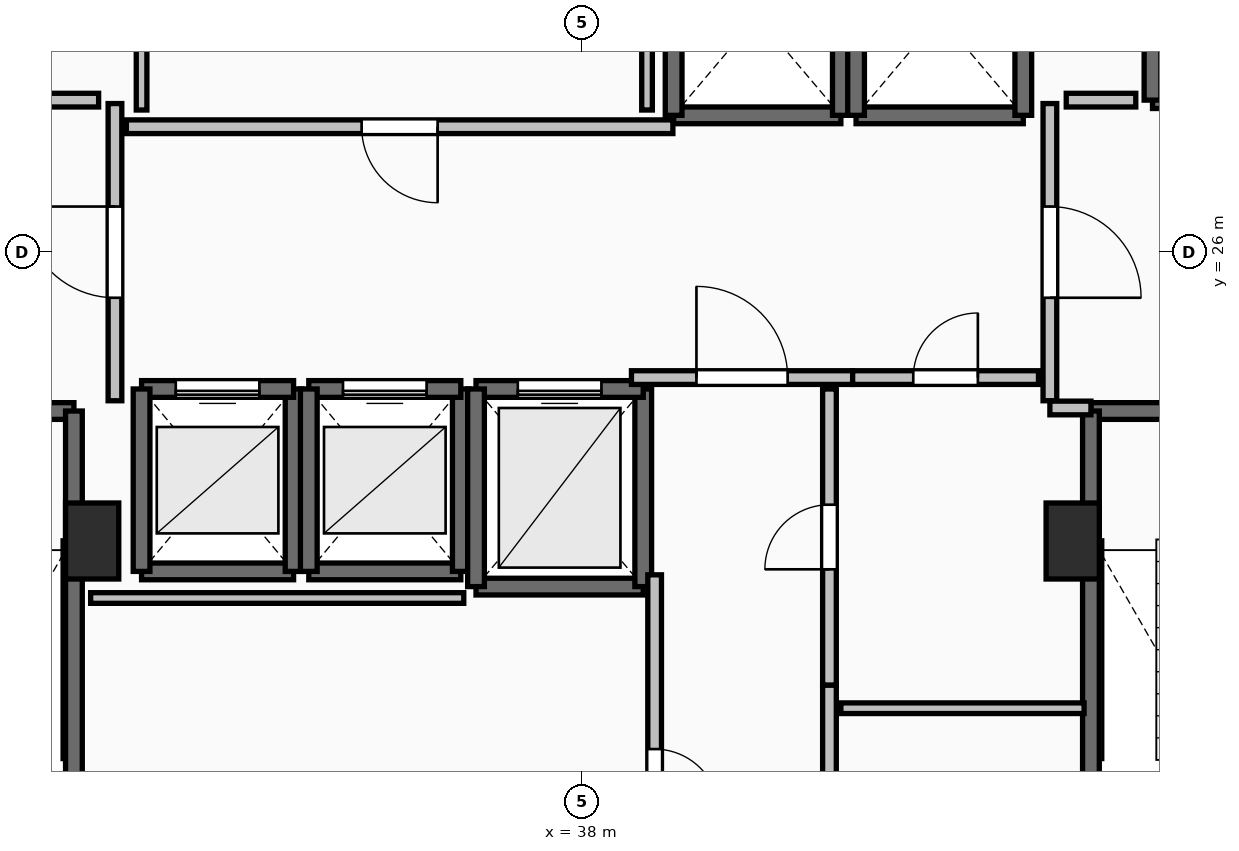
"""IFC4 building model, lengths in metres.
Left out: names, types, materials, properties, quantities, classifications, styles, units other than length and angle.
Written with IfcOpenShell. Run it as: python <this file> out.ifc"""

import sys

from ifc_helpers import new_model, si_unit, direction, frame, frame_2d, origin, origin_2d, place, context, subcontext, project, spatial, rectangle, extrude, element, fill, save


model = new_model("IFC4")
c1 = context("Model", 3, precision=1e-05, world=origin(), true_north=direction((0.0, 1.0)))
c2 = subcontext(c1, "Body", "Model", "MODEL_VIEW")
j1 = project(units=[si_unit("LENGTHUNIT", "METRE"), si_unit("PLANEANGLEUNIT", "RADIAN")], contexts=[c1])
p1 = place(None, origin())
s1 = spatial("IfcSite", under=j1, at=p1, CompositionType="ELEMENT")
p2 = place(p1, origin())
s2 = spatial("IfcBuilding", under=s1, at=p2, CompositionType="ELEMENT")
p3 = place(p2, frame((0.0, 0.0, 207.2)))
s3 = spatial("IfcBuildingStorey", under=s2, at=p3, CompositionType="ELEMENT", Elevation=207.2)
for number, where, z_axis, x_axis in (
    (1, (31.55, 22.2, 0.0), (0.0, 0.0, 1.0), (1.0, 0.0, 0.0)),
    (2, (44.45, 22.2, 0.0), (0.0, 0.0, 1.0), (1.0, 0.0, 0.0)),
):
    element("IfcColumn", number, at=place(p3, frame(where, z_axis=z_axis, x_axis=x_axis)), inside=s3, PredefinedType="PILASTER", context=c2, shape_type="SweptSolid", body=[
        extrude(rectangle(XDim=0.7, YDim=1.0, at=origin_2d()), origin(), (0.0, 0.0, 1.0), 3.55),
    ])
p4 = place(p3, frame((27.94, 23.91, 0.0), z_axis=(0.0, 0.0, 1.0), x_axis=(1.0, 0.0, 0.0)))
e3 = element("IfcWall", 3, at=p4, inside=s3, PredefinedType="SOLIDWALL", context=c2, shape_type="SweptSolid", body=[
    extrude(rectangle(XDim=3.37, YDim=0.22, at=frame_2d((1.685, 0.0))), origin(), (0.0, 0.0, 1.0), 3.29),
])
p5 = place(p4, frame((1.135, 0.0, 0.0)))
e4 = element("IfcOpeningElement", 4, at=p5, cuts=e3, PredefinedType="OPENING", context=c2, shape_type="SweptSolid", body=[
    extrude(rectangle(XDim=1.1, YDim=2.15, at=frame_2d((0.55, 1.075))), frame((0.0, 0.125, 0.0), z_axis=(0.0, -1.0, 0.0), x_axis=(1.0, 0.0, 0.0)), (0.0, 0.0, 1.0), 0.25),
])
p6 = place(p3, frame((31.31, 23.91, 0.0), z_axis=(0.0, 0.0, 1.0), x_axis=(0.0, -1.0, 0.0)))
e5 = element("IfcWall", 5, at=p6, inside=s3, PredefinedType="SOLIDWALL", context=c2, shape_type="SweptSolid", body=[
    extrude(rectangle(XDim=7.42, YDim=0.22, at=frame_2d((3.71, 0.0))), origin(), (0.0, 0.0, 1.0), 3.29),
])
p7 = place(p3, frame((44.69, 23.91, 0.0), z_axis=(0.0, 0.0, 1.0), x_axis=(1.0, 0.0, 0.0)))
e6 = element("IfcWall", 6, at=p7, inside=s3, PredefinedType="SOLIDWALL", context=c2, shape_type="SweptSolid", body=[
    extrude(rectangle(XDim=3.37, YDim=0.22, at=frame_2d((1.685, 0.0))), origin(), (0.0, 0.0, 1.0), 3.29),
])
p8 = place(p7, frame((1.135, 0.0, 0.0)))
e7 = element("IfcOpeningElement", 7, at=p8, cuts=e6, PredefinedType="OPENING", context=c2, shape_type="SweptSolid", body=[
    extrude(rectangle(XDim=1.1, YDim=2.15, at=frame_2d((0.55, 1.075))), frame((0.0, 0.125, 0.0), z_axis=(0.0, -1.0, 0.0), x_axis=(1.0, 0.0, 0.0)), (0.0, 0.0, 1.0), 0.25),
])
p9 = place(p3, frame((44.69, 16.49, 0.0), z_axis=(0.0, 0.0, 1.0), x_axis=(0.0, 1.0, 0.0)))
e8 = element("IfcWall", 8, at=p9, inside=s3, PredefinedType="SOLIDWALL", context=c2, shape_type="SweptSolid", body=[
    extrude(rectangle(XDim=7.42, YDim=0.22, at=frame_2d((3.71, 0.0))), origin(), (0.0, 0.0, 1.0), 3.29),
])
p10 = place(p3, frame((32.2, 21.8, 0.0), z_axis=(0.0, 0.0, 1.0), x_axis=(1.0, 0.0, 0.0)))
e9 = element("IfcWall", 9, at=p10, inside=s3, PredefinedType="SOLIDWALL", context=c2, shape_type="SweptSolid", body=[
    extrude(rectangle(XDim=2.0, YDim=0.22, at=frame_2d((1.0, 0.0))), origin(), (0.0, 0.0, 1.0), 3.29),
])
p11 = place(p3, frame((34.2, 21.8, 0.0), z_axis=(0.0, 0.0, 1.0), x_axis=(0.0, 1.0, 0.0)))
e10 = element("IfcWall", 10, at=p11, inside=s3, PredefinedType="SOLIDWALL", context=c2, shape_type="SweptSolid", body=[
    extrude(rectangle(XDim=2.4, YDim=0.22, at=frame_2d((1.2, 0.0))), origin(), (0.0, 0.0, 1.0), 3.29),
])
p12 = place(p3, frame((34.2, 24.2, 0.0), z_axis=(0.0, 0.0, 1.0), x_axis=(-1.0, 0.0, 0.0)))
e11 = element("IfcWall", 11, at=p12, inside=s3, PredefinedType="SOLIDWALL", context=c2, shape_type="SweptSolid", body=[
    extrude(rectangle(XDim=2.0, YDim=0.22, at=frame_2d((1.0, 0.0))), origin(), (0.0, 0.0, 1.0), 3.29),
])
p13 = place(p12, frame((0.45, 0.0, 0.0)))
e12 = element("IfcOpeningElement", 12, at=p13, cuts=e11, PredefinedType="OPENING", context=c2, shape_type="SweptSolid", body=[
    extrude(rectangle(XDim=1.1, YDim=2.2, at=frame_2d((0.55, 1.1))), frame((0.0, 0.125, 0.0), z_axis=(0.0, -1.0, 0.0), x_axis=(1.0, 0.0, 0.0)), (0.0, 0.0, 1.0), 0.25),
])
p14 = place(p3, frame((32.2, 24.2, 0.0), z_axis=(0.0, 0.0, 1.0), x_axis=(0.0, -1.0, 0.0)))
e13 = element("IfcWall", 13, at=p14, inside=s3, PredefinedType="SOLIDWALL", context=c2, shape_type="SweptSolid", body=[
    extrude(rectangle(XDim=2.4, YDim=0.22, at=frame_2d((1.2, 0.0))), origin(), (0.0, 0.0, 1.0), 3.29),
])
p15 = place(p3, frame((34.4, 21.8, 0.0), z_axis=(0.0, 0.0, 1.0), x_axis=(1.0, 0.0, 0.0)))
e14 = element("IfcWall", 14, at=p15, inside=s3, PredefinedType="SOLIDWALL", context=c2, shape_type="SweptSolid", body=[
    extrude(rectangle(XDim=2.0, YDim=0.22, at=frame_2d((1.0, 0.0))), origin(), (0.0, 0.0, 1.0), 3.29),
])
p16 = place(p3, frame((36.4, 21.8, 0.0), z_axis=(0.0, 0.0, 1.0), x_axis=(0.0, 1.0, 0.0)))
e15 = element("IfcWall", 15, at=p16, inside=s3, PredefinedType="SOLIDWALL", context=c2, shape_type="SweptSolid", body=[
    extrude(rectangle(XDim=2.4, YDim=0.22, at=frame_2d((1.2, 0.0))), origin(), (0.0, 0.0, 1.0), 3.29),
])
p17 = place(p3, frame((36.4, 24.2, 0.0), z_axis=(0.0, 0.0, 1.0), x_axis=(-1.0, 0.0, 0.0)))
e16 = element("IfcWall", 16, at=p17, inside=s3, PredefinedType="SOLIDWALL", context=c2, shape_type="SweptSolid", body=[
    extrude(rectangle(XDim=2.0, YDim=0.22, at=frame_2d((1.0, 0.0))), origin(), (0.0, 0.0, 1.0), 3.29),
])
p18 = place(p17, frame((0.45, 0.0, 0.0)))
e17 = element("IfcOpeningElement", 17, at=p18, cuts=e16, PredefinedType="OPENING", context=c2, shape_type="SweptSolid", body=[
    extrude(rectangle(XDim=1.1, YDim=2.2, at=frame_2d((0.55, 1.1))), frame((0.0, 0.125, 0.0), z_axis=(0.0, -1.0, 0.0), x_axis=(1.0, 0.0, 0.0)), (0.0, 0.0, 1.0), 0.25),
])
p19 = place(p3, frame((34.4, 24.2, 0.0), z_axis=(0.0, 0.0, 1.0), x_axis=(0.0, -1.0, 0.0)))
e18 = element("IfcWall", 18, at=p19, inside=s3, PredefinedType="SOLIDWALL", context=c2, shape_type="SweptSolid", body=[
    extrude(rectangle(XDim=2.4, YDim=0.22, at=frame_2d((1.2, 0.0))), origin(), (0.0, 0.0, 1.0), 3.29),
])
p20 = place(p3, frame((36.6, 21.6, 0.0), z_axis=(0.0, 0.0, 1.0), x_axis=(1.0, 0.0, 0.0)))
e19 = element("IfcWall", 19, at=p20, inside=s3, PredefinedType="SOLIDWALL", context=c2, shape_type="SweptSolid", body=[
    extrude(rectangle(XDim=2.2, YDim=0.22, at=frame_2d((1.1, 0.0))), origin(), (0.0, 0.0, 1.0), 3.29),
])
p21 = place(p3, frame((38.8, 21.6, 0.0), z_axis=(0.0, 0.0, 1.0), x_axis=(0.0, 1.0, 0.0)))
e20 = element("IfcWall", 20, at=p21, inside=s3, PredefinedType="SOLIDWALL", context=c2, shape_type="SweptSolid", body=[
    extrude(rectangle(XDim=2.6, YDim=0.22, at=frame_2d((1.3, 0.0))), origin(), (0.0, 0.0, 1.0), 3.29),
])
p22 = place(p3, frame((38.8, 24.2, 0.0), z_axis=(0.0, 0.0, 1.0), x_axis=(-1.0, 0.0, 0.0)))
e21 = element("IfcWall", 21, at=p22, inside=s3, PredefinedType="SOLIDWALL", context=c2, shape_type="SweptSolid", body=[
    extrude(rectangle(XDim=2.2, YDim=0.22, at=frame_2d((1.1, 0.0))), origin(), (0.0, 0.0, 1.0), 3.29),
])
p23 = place(p22, frame((0.55, 0.0, 0.0)))
e22 = element("IfcOpeningElement", 22, at=p23, cuts=e21, PredefinedType="OPENING", context=c2, shape_type="SweptSolid", body=[
    extrude(rectangle(XDim=1.1, YDim=2.2, at=frame_2d((0.55, 1.1))), frame((0.0, 0.125, 0.0), z_axis=(0.0, -1.0, 0.0), x_axis=(1.0, 0.0, 0.0)), (0.0, 0.0, 1.0), 0.25),
])
p24 = place(p3, frame((36.6, 24.2, 0.0), z_axis=(0.0, 0.0, 1.0), x_axis=(0.0, -1.0, 0.0)))
e23 = element("IfcWall", 23, at=p24, inside=s3, PredefinedType="SOLIDWALL", context=c2, shape_type="SweptSolid", body=[
    extrude(rectangle(XDim=2.6, YDim=0.22, at=frame_2d((1.3, 0.0))), origin(), (0.0, 0.0, 1.0), 3.29),
])
p25 = place(p3, frame((39.2, 27.8, 0.0), z_axis=(0.0, 0.0, 1.0), x_axis=(1.0, 0.0, 0.0)))
e24 = element("IfcWall", 24, at=p25, inside=s3, PredefinedType="SOLIDWALL", context=c2, shape_type="SweptSolid", body=[
    extrude(rectangle(XDim=2.2, YDim=0.22, at=frame_2d((1.1, 0.0))), origin(), (0.0, 0.0, 1.0), 3.29),
])
for number, where, z_axis, x_axis in (
    (25, (41.4, 27.8, 0.0), (0.0, 0.0, 1.0), (0.0, 1.0, 0.0)),
    (26, (39.2, 30.4, 0.0), (0.0, 0.0, 1.0), (0.0, -1.0, 0.0)),
):
    element("IfcWall", number, at=place(p3, frame(where, z_axis=z_axis, x_axis=x_axis)), inside=s3, PredefinedType="SOLIDWALL", context=c2, shape_type="SweptSolid", body=[
        extrude(rectangle(XDim=2.6, YDim=0.22, at=frame_2d((1.3, 0.0))), origin(), (0.0, 0.0, 1.0), 3.29),
    ])
p26 = place(p3, frame((41.6, 27.8, 0.0), z_axis=(0.0, 0.0, 1.0), x_axis=(1.0, 0.0, 0.0)))
e27 = element("IfcWall", 27, at=p26, inside=s3, PredefinedType="SOLIDWALL", context=c2, shape_type="SweptSolid", body=[
    extrude(rectangle(XDim=2.2, YDim=0.22, at=frame_2d((1.1, 0.0))), origin(), (0.0, 0.0, 1.0), 3.29),
])
for number, where, z_axis, x_axis in (
    (28, (43.8, 27.8, 0.0), (0.0, 0.0, 1.0), (0.0, 1.0, 0.0)),
    (29, (41.6, 30.4, 0.0), (0.0, 0.0, 1.0), (0.0, -1.0, 0.0)),
):
    element("IfcWall", number, at=place(p3, frame(where, z_axis=z_axis, x_axis=x_axis)), inside=s3, PredefinedType="SOLIDWALL", context=c2, shape_type="SweptSolid", body=[
        extrude(rectangle(XDim=2.6, YDim=0.22, at=frame_2d((1.3, 0.0))), origin(), (0.0, 0.0, 1.0), 3.29),
    ])
p27 = place(p3, frame((45.5, 28.0, 0.0), z_axis=(0.0, 0.0, 1.0), x_axis=(1.0, 0.0, 0.0)))
e30 = element("IfcWall", 30, at=p27, inside=s3, PredefinedType="SHEAR", context=c2, shape_type="SweptSolid", body=[
    extrude(rectangle(XDim=2.4, YDim=0.22, at=frame_2d((1.2, 0.0))), origin(), (0.0, 0.0, 1.0), 3.29),
])
p28 = place(p27, frame((0.6, 0.0, 0.0)))
e31 = element("IfcOpeningElement", 31, at=p28, cuts=e30, PredefinedType="OPENING", context=c2, shape_type="SweptSolid", body=[
    extrude(rectangle(XDim=1.2, YDim=2.2, at=frame_2d((0.6, 1.1))), frame((0.0, 0.125, 0.0), z_axis=(0.0, -1.0, 0.0), x_axis=(1.0, 0.0, 0.0)), (0.0, 0.0, 1.0), 0.25),
])
p29 = place(p3, frame((45.5, 30.5, 0.0), z_axis=(0.0, 0.0, 1.0), x_axis=(0.0, -1.0, 0.0)))
e32 = element("IfcWall", 32, at=p29, inside=s3, PredefinedType="SHEAR", context=c2, shape_type="SweptSolid", body=[
    extrude(rectangle(XDim=2.5, YDim=0.22, at=frame_2d((1.25, 0.0))), origin(), (0.0, 0.0, 1.0), 3.29),
])
p30 = place(p3, frame((31.85, 24.045, 0.0), z_axis=(0.0, 0.0, 1.0), x_axis=(0.0, 1.0, 0.0)))
e33 = element("IfcWall", 33, at=p30, inside=s3, PredefinedType="PARTITIONING", context=c2, shape_type="SweptSolid", body=[
    extrude(rectangle(XDim=3.91, YDim=0.18, at=frame_2d((1.955, 0.0))), origin(), (0.0, 0.0, 1.0), 3.29),
])
p31 = place(p30, frame((1.355, 0.0, 0.0)))
e34 = element("IfcOpeningElement", 34, at=p31, cuts=e33, PredefinedType="OPENING", context=c2, shape_type="SweptSolid", body=[
    extrude(rectangle(XDim=1.2, YDim=2.15, at=frame_2d((0.6, 1.075))), frame((0.0, 0.105, 0.0), z_axis=(0.0, -1.0, 0.0), x_axis=(1.0, 0.0, 0.0)), (0.0, 0.0, 1.0), 0.21),
])
p32 = place(p3, frame((44.15, 27.955, 0.0), z_axis=(0.0, 0.0, 1.0), x_axis=(0.0, -1.0, 0.0)))
e35 = element("IfcWall", 35, at=p32, inside=s3, PredefinedType="PARTITIONING", context=c2, shape_type="SweptSolid", body=[
    extrude(rectangle(XDim=3.91, YDim=0.18, at=frame_2d((1.955, 0.0))), origin(), (0.0, 0.0, 1.0), 3.29),
])
p33 = place(p32, frame((1.355, 0.0, 0.0)))
e36 = element("IfcOpeningElement", 36, at=p33, cuts=e35, PredefinedType="OPENING", context=c2, shape_type="SweptSolid", body=[
    extrude(rectangle(XDim=1.2, YDim=2.15, at=frame_2d((0.6, 1.075))), frame((0.0, 0.105, 0.0), z_axis=(0.0, -1.0, 0.0), x_axis=(1.0, 0.0, 0.0)), (0.0, 0.0, 1.0), 0.21),
])
p34 = place(p3, frame((44.15, 23.95, 0.0), z_axis=(0.0, 0.0, 1.0), x_axis=(1.0, 0.0, 0.0)))
e37 = element("IfcWall", 37, at=p34, inside=s3, PredefinedType="PARTITIONING", context=c2, shape_type="SweptSolid", body=[
    extrude(rectangle(XDim=0.54, YDim=0.18, at=frame_2d((0.27, 0.0))), origin(), (0.0, 0.0, 1.0), 3.29),
])
p35 = place(p3, frame((38.645, 24.35, 0.0), z_axis=(0.0, 0.0, 1.0), x_axis=(1.0, 0.0, 0.0)))
e38 = element("IfcWall", 38, at=p35, inside=s3, PredefinedType="PARTITIONING", context=c2, shape_type="SweptSolid", body=[
    extrude(rectangle(XDim=2.91, YDim=0.18, at=frame_2d((1.455, 0.0))), origin(), (0.0, 0.0, 1.0), 3.29),
])
p36 = place(p35, frame((0.855, 0.0, 0.0)))
e39 = element("IfcOpeningElement", 39, at=p36, cuts=e38, PredefinedType="OPENING", context=c2, shape_type="SweptSolid", body=[
    extrude(rectangle(XDim=1.2, YDim=2.15, at=frame_2d((0.6, 1.075))), frame((0.0, 0.105, 0.0), z_axis=(0.0, -1.0, 0.0), x_axis=(1.0, 0.0, 0.0)), (0.0, 0.0, 1.0), 0.21),
])
p37 = place(p3, frame((41.555, 24.35, 0.0), z_axis=(0.0, 0.0, 1.0), x_axis=(1.0, 0.0, 0.0)))
e40 = element("IfcWall", 40, at=p37, inside=s3, PredefinedType="PARTITIONING", context=c2, shape_type="SweptSolid", body=[
    extrude(rectangle(XDim=2.445, YDim=0.18, at=frame_2d((1.223, 0.0))), origin(), (0.0, 0.0, 1.0), 3.29),
])
p38 = place(p37, frame((0.798, 0.0, 0.0)))
e41 = element("IfcOpeningElement", 41, at=p38, cuts=e40, PredefinedType="OPENING", context=c2, shape_type="SweptSolid", body=[
    extrude(rectangle(XDim=0.85, YDim=2.1, at=frame_2d((0.425, 1.05))), frame((0.0, 0.105, 0.0), z_axis=(0.0, -1.0, 0.0), x_axis=(1.0, 0.0, 0.0)), (0.0, 0.0, 1.0), 0.21),
])
p39 = place(p3, frame((39.19, 27.65, 0.0), z_axis=(0.0, 0.0, 1.0), x_axis=(-1.0, 0.0, 0.0)))
e42 = element("IfcWall", 42, at=p39, inside=s3, PredefinedType="PARTITIONING", context=c2, shape_type="SweptSolid", body=[
    extrude(rectangle(XDim=7.19, YDim=0.18, at=frame_2d((3.595, 0.0))), origin(), (0.0, 0.0, 1.0), 3.29),
])
p40 = place(p39, frame((3.095, 0.0, 0.0)))
e43 = element("IfcOpeningElement", 43, at=p40, cuts=e42, PredefinedType="OPENING", context=c2, shape_type="SweptSolid", body=[
    extrude(rectangle(XDim=1.0, YDim=2.15, at=frame_2d((0.5, 1.075))), frame((0.0, 0.105, 0.0), z_axis=(0.0, -1.0, 0.0), x_axis=(1.0, 0.0, 0.0)), (0.0, 0.0, 1.0), 0.21),
])
p41 = place(p3, frame((41.25, 16.32, 0.0), z_axis=(0.0, 0.0, 1.0), x_axis=(0.0, 1.0, 0.0)))
e44 = element("IfcWall", 44, at=p41, inside=s3, PredefinedType="PARTITIONING", context=c2, shape_type="SweptSolid", body=[
    extrude(rectangle(XDim=3.985, YDim=0.18, at=frame_2d((1.992, 0.0))), origin(), (0.0, 0.0, 1.0), 3.29),
])
p42 = place(p41, frame((1.593, 0.0, 0.0)))
e45 = element("IfcOpeningElement", 45, at=p42, cuts=e44, PredefinedType="OPENING", context=c2, shape_type="SweptSolid", body=[
    extrude(rectangle(XDim=0.8, YDim=2.05, at=frame_2d((0.4, 1.025))), frame((0.0, 0.105, 0.0), z_axis=(0.0, -1.0, 0.0), x_axis=(1.0, 0.0, 0.0)), (0.0, 0.0, 1.0), 0.21),
])
p43 = place(p3, frame((41.25, 20.305, 0.0), z_axis=(0.0, 0.0, 1.0), x_axis=(0.0, 1.0, 0.0)))
e46 = element("IfcWall", 46, at=p43, inside=s3, PredefinedType="PARTITIONING", context=c2, shape_type="SweptSolid", body=[
    extrude(rectangle(XDim=3.895, YDim=0.18, at=frame_2d((1.948, 0.0))), origin(), (0.0, 0.0, 1.0), 3.29),
])
p44 = place(p43, frame((1.522, 0.0, 0.0)))
e47 = element("IfcOpeningElement", 47, at=p44, cuts=e46, PredefinedType="OPENING", context=c2, shape_type="SweptSolid", body=[
    extrude(rectangle(XDim=0.85, YDim=2.1, at=frame_2d((0.425, 1.05))), frame((0.0, 0.105, 0.0), z_axis=(0.0, -1.0, 0.0), x_axis=(1.0, 0.0, 0.0)), (0.0, 0.0, 1.0), 0.21),
])
p45 = place(p3, frame((38.95, 21.755, 0.0), z_axis=(0.0, 0.0, 1.0), x_axis=(0.0, -1.0, 0.0)))
e48 = element("IfcWall", 48, at=p45, inside=s3, PredefinedType="PARTITIONING", context=c2, shape_type="SweptSolid", body=[
    extrude(rectangle(XDim=5.435, YDim=0.18, at=frame_2d((2.717, 0.0))), origin(), (0.0, 0.0, 1.0), 3.29),
])
p46 = place(p45, frame((2.292, 0.0, 0.0)))
e49 = element("IfcOpeningElement", 49, at=p46, cuts=e48, PredefinedType="OPENING", context=c2, shape_type="SweptSolid", body=[
    extrude(rectangle(XDim=0.85, YDim=2.1, at=frame_2d((0.425, 1.05))), frame((0.0, 0.105, 0.0), z_axis=(0.0, -1.0, 0.0), x_axis=(1.0, 0.0, 0.0)), (0.0, 0.0, 1.0), 0.21),
])
p47 = place(p3, frame((44.6, 20.0, 0.0), z_axis=(0.0, 0.0, 1.0), x_axis=(-1.0, 0.0, 0.0)))
e50 = element("IfcWall", 50, at=p47, inside=s3, PredefinedType="PARTITIONING", context=c2, shape_type="SweptSolid", body=[
    extrude(rectangle(XDim=3.2, YDim=0.14, at=frame_2d((1.6, 0.0))), origin(), (0.0, 0.0, 1.0), 3.29),
])
for number, where, z_axis, x_axis in (
    (51, (31.635, 28.0, 0.0), (0.0, 0.0, 1.0), (-1.0, 0.0, 0.0)),
    (52, (45.28, 28.0, 0.0), (0.0, 0.0, 1.0), (-1.0, 0.0, 0.0)),
):
    element("IfcWall", number, at=place(p3, frame(where, z_axis=z_axis, x_axis=x_axis)), inside=s3, PredefinedType="PARTITIONING", context=c2, shape_type="SweptSolid", body=[
        extrude(rectangle(XDim=0.915, YDim=0.18, at=frame_2d((0.458, 0.0))), origin(), (0.0, 0.0, 1.0), 3.29),
    ])
p48 = place(p3, frame((36.439, 21.45, 0.0), z_axis=(0.0, 0.0, 1.0), x_axis=(-1.0, 0.0, 0.0)))
e53 = element("IfcWall", 53, at=p48, inside=s3, PredefinedType="PARTITIONING", context=c2, shape_type="SweptSolid", body=[
    extrude(rectangle(XDim=4.909, YDim=0.14, at=frame_2d((2.455, 0.0))), origin(), (0.0, 0.0, 1.0), 3.29),
])
for number, where, z_axis, x_axis in (
    (54, (32.2, 30.26, 0.0), (0.0, 0.0, 1.0), (0.0, -1.0, 0.0)),
    (55, (38.85, 27.87, 0.0), (0.0, 0.0, 1.0), (0.0, 1.0, 0.0)),
):
    element("IfcWall", number, at=place(p3, frame(where, z_axis=z_axis, x_axis=x_axis)), inside=s3, PredefinedType="PARTITIONING", context=c2, shape_type="SweptSolid", body=[
        extrude(rectangle(XDim=2.39, YDim=0.14, at=frame_2d((1.195, 0.0))), origin(), (0.0, 0.0, 1.0), 3.29),
    ])
p49 = place(p13, origin())
e56 = element("IfcDoor", 56, at=p49, inside=s3, OperationType="SLIDING_TO_LEFT", PredefinedType="DOOR", context=c2, shape_type="SweptSolid", body=[
    extrude(rectangle(XDim=1.1, YDim=2.2, at=frame_2d((0.55, 1.1))), frame((0.0, 0.025, 0.0), z_axis=(0.0, -1.0, 0.0), x_axis=(1.0, 0.0, 0.0)), (0.0, 0.0, 1.0), 0.05),
])
fill(e12, e56)
p50 = place(p18, origin())
e57 = element("IfcDoor", 57, at=p50, inside=s3, OperationType="SLIDING_TO_LEFT", PredefinedType="DOOR", context=c2, shape_type="SweptSolid", body=[
    extrude(rectangle(XDim=1.1, YDim=2.2, at=frame_2d((0.55, 1.1))), frame((0.0, 0.025, 0.0), z_axis=(0.0, -1.0, 0.0), x_axis=(1.0, 0.0, 0.0)), (0.0, 0.0, 1.0), 0.05),
])
fill(e17, e57)
p51 = place(p23, origin())
e58 = element("IfcDoor", 58, at=p51, inside=s3, OperationType="SLIDING_TO_LEFT", PredefinedType="DOOR", context=c2, shape_type="SweptSolid", body=[
    extrude(rectangle(XDim=1.1, YDim=2.2, at=frame_2d((0.55, 1.1))), frame((0.0, 0.025, 0.0), z_axis=(0.0, -1.0, 0.0), x_axis=(1.0, 0.0, 0.0)), (0.0, 0.0, 1.0), 0.05),
])
fill(e22, e58)
p52 = place(p31, origin())
e59 = element("IfcDoor", 59, at=p52, inside=s3, OperationType="SINGLE_SWING_RIGHT", PredefinedType="DOOR", context=c2, shape_type="SweptSolid", body=[
    extrude(rectangle(XDim=1.2, YDim=2.15, at=frame_2d((0.6, 1.075))), frame((0.0, 0.025, 0.0), z_axis=(0.0, -1.0, 0.0), x_axis=(1.0, 0.0, 0.0)), (0.0, 0.0, 1.0), 0.05),
])
fill(e34, e59)
p53 = place(p33, origin())
e60 = element("IfcDoor", 60, at=p53, inside=s3, OperationType="SINGLE_SWING_RIGHT", PredefinedType="DOOR", context=c2, shape_type="SweptSolid", body=[
    extrude(rectangle(XDim=1.2, YDim=2.15, at=frame_2d((0.6, 1.075))), frame((0.0, 0.025, 0.0), z_axis=(0.0, -1.0, 0.0), x_axis=(1.0, 0.0, 0.0)), (0.0, 0.0, 1.0), 0.05),
])
fill(e36, e60)
p54 = place(p36, origin())
e61 = element("IfcDoor", 61, at=p54, inside=s3, OperationType="SINGLE_SWING_LEFT", PredefinedType="DOOR", context=c2, shape_type="SweptSolid", body=[
    extrude(rectangle(XDim=1.2, YDim=2.15, at=frame_2d((0.6, 1.075))), frame((0.0, 0.025, 0.0), z_axis=(0.0, -1.0, 0.0), x_axis=(1.0, 0.0, 0.0)), (0.0, 0.0, 1.0), 0.05),
])
fill(e39, e61)
p55 = place(p38, origin())
e62 = element("IfcDoor", 62, at=p55, inside=s3, OperationType="SINGLE_SWING_RIGHT", PredefinedType="DOOR", context=c2, shape_type="SweptSolid", body=[
    extrude(rectangle(XDim=0.85, YDim=2.1, at=frame_2d((0.425, 1.05))), frame((0.0, 0.025, 0.0), z_axis=(0.0, -1.0, 0.0), x_axis=(1.0, 0.0, 0.0)), (0.0, 0.0, 1.0), 0.05),
])
fill(e41, e62)
p56 = place(p40, origin())
e63 = element("IfcDoor", 63, at=p56, inside=s3, OperationType="SINGLE_SWING_LEFT", PredefinedType="DOOR", context=c2, shape_type="SweptSolid", body=[
    extrude(rectangle(XDim=1.0, YDim=2.15, at=frame_2d((0.5, 1.075))), frame((0.0, 0.025, 0.0), z_axis=(0.0, -1.0, 0.0), x_axis=(1.0, 0.0, 0.0)), (0.0, 0.0, 1.0), 0.05),
])
fill(e43, e63)
p57 = place(p44, origin())
e64 = element("IfcDoor", 64, at=p57, inside=s3, OperationType="SINGLE_SWING_LEFT", PredefinedType="DOOR", context=c2, shape_type="SweptSolid", body=[
    extrude(rectangle(XDim=0.85, YDim=2.1, at=frame_2d((0.425, 1.05))), frame((0.0, 0.025, 0.0), z_axis=(0.0, -1.0, 0.0), x_axis=(1.0, 0.0, 0.0)), (0.0, 0.0, 1.0), 0.05),
])
fill(e47, e64)
p58 = place(p46, origin())
e65 = element("IfcDoor", 65, at=p58, inside=s3, OperationType="SINGLE_SWING_RIGHT", PredefinedType="DOOR", context=c2, shape_type="SweptSolid", body=[
    extrude(rectangle(XDim=0.85, YDim=2.1, at=frame_2d((0.425, 1.05))), frame((0.0, 0.025, 0.0), z_axis=(0.0, -1.0, 0.0), x_axis=(1.0, 0.0, 0.0)), (0.0, 0.0, 1.0), 0.05),
])
fill(e49, e65)
save(model, sys.argv[1])
